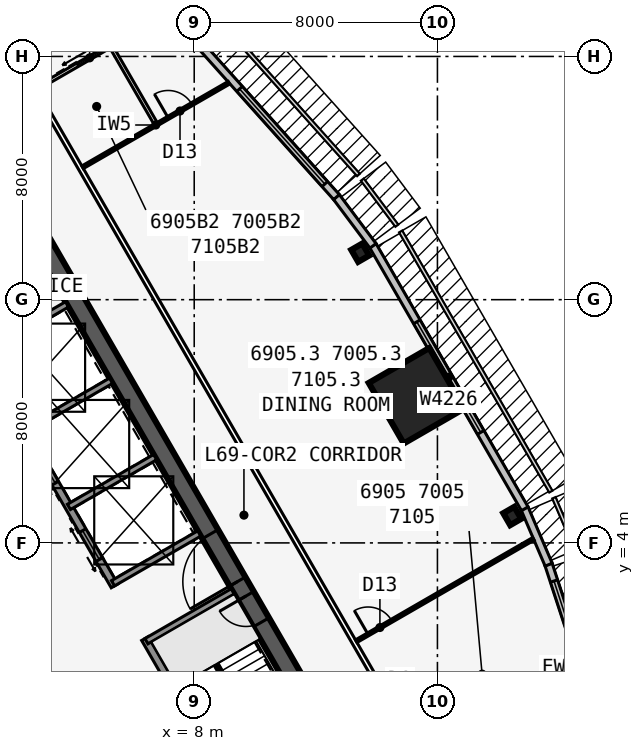
"""IFC4 building model, lengths in metres.
Left out: names, types, materials, properties, quantities, classifications, styles, units other than length and angle.
Written with IfcOpenShell. Run it as: python <this file> out.ifc"""

import sys

from ifc_helpers import new_model, si_unit, direction, frame, frame_2d, origin, origin_2d, place, context, subcontext, project, spatial, rectangle, i_section, extrude, element, fill, save


model = new_model("IFC4")
c1 = context("Model", 3, precision=1e-05, world=origin(), true_north=direction((0.0, 1.0)))
c2 = subcontext(c1, "Body", "Model", "MODEL_VIEW")
j1 = project(units=[si_unit("LENGTHUNIT", "METRE"), si_unit("PLANEANGLEUNIT", "RADIAN")], contexts=[c1])
p1 = place(None, origin())
s1 = spatial("IfcSite", under=j1, at=p1, CompositionType="ELEMENT")
p2 = place(p1, origin())
s2 = spatial("IfcBuilding", under=s1, at=p2, CompositionType="ELEMENT")
p3 = place(p2, frame((0.0, 0.0, 260.9)))
s3 = spatial("IfcBuildingStorey", under=s2, at=p3, CompositionType="ELEMENT", Elevation=260.9)
p4 = place(p3, frame((16.5, -9.526, 0.0), z_axis=(0.0, 0.0, 1.0), x_axis=(-0.499999749417, 0.866025548458, 0.0)))
e1 = element("IfcWall", 1, at=p4, inside=s3, PredefinedType="SHEAR", context=c2, shape_type="SweptSolid", body=[
    extrude(rectangle(XDim=33.0, YDim=0.6, at=frame_2d((16.5, 0.0))), origin(), (0.0, 0.0, 1.0), 3.6),
])
p5 = place(p4, frame((14.15, 0.0, 0.0)))
e2 = element("IfcOpeningElement", 2, at=p5, cuts=e1, PredefinedType="OPENING", context=c2, shape_type="SweptSolid", body=[
    extrude(rectangle(XDim=1.8, YDim=2.13, at=frame_2d((0.9, 1.065))), frame((0.0, 0.31, 0.0), z_axis=(0.0, -1.0, 0.0), x_axis=(1.0, 0.0, 0.0)), (0.0, 0.0, 1.0), 0.62),
])
p6 = place(p4, frame((12.6, 0.0, 0.0)))
e3 = element("IfcOpeningElement", 3, at=p6, cuts=e1, PredefinedType="OPENING", context=c2, shape_type="SweptSolid", body=[
    extrude(rectangle(XDim=1.0, YDim=2.13, at=frame_2d((0.5, 1.065))), frame((0.0, 0.31, 0.0), z_axis=(0.0, -1.0, 0.0), x_axis=(1.0, 0.0, 0.0)), (0.0, 0.0, 1.0), 0.62),
])
p7 = place(p3, frame((10.245, -5.843, 0.0), z_axis=(0.0, 0.0, 1.0), x_axis=(-0.499993009313, 0.866029439822, 0.0)))
e4 = element("IfcWall", 4, at=p7, inside=s3, PredefinedType="SOLIDWALL", context=c2, shape_type="SweptSolid", body=[
    extrude(rectangle(XDim=7.733, YDim=0.25, at=frame_2d((3.866, 0.0))), origin(), (0.0, 0.0, 1.0), 3.435),
])
p8 = place(p3, frame((5.379, 2.586, 0.0), z_axis=(0.0, 0.0, 1.0), x_axis=(-0.500001375892, 0.866024609411, 0.0)))
e5 = element("IfcWall", 5, at=p8, inside=s3, PredefinedType="SOLIDWALL", context=c2, shape_type="SweptSolid", body=[
    extrude(rectangle(XDim=10.633, YDim=0.25, at=frame_2d((5.316, 0.0))), origin(), (0.0, 0.0, 1.0), 3.435),
])
p9 = place(p8, frame((9.164, 0.0, 0.0)))
e6 = element("IfcOpeningElement", 6, at=p9, cuts=e5, PredefinedType="OPENING", context=c2, shape_type="SweptSolid", body=[
    extrude(rectangle(XDim=0.9, YDim=2.13, at=frame_2d((0.45, 1.065))), frame((0.0, 0.135, 0.0), z_axis=(0.0, -1.0, 0.0), x_axis=(1.0, 0.0, 0.0)), (0.0, 0.0, 1.0), 0.27),
])
p10 = place(p8, frame((1.0, 0.0, 0.0)))
e7 = element("IfcOpeningElement", 7, at=p10, cuts=e5, PredefinedType="OPENING", context=c2, shape_type="SweptSolid", body=[
    extrude(rectangle(XDim=1.1, YDim=2.13, at=frame_2d((0.55, 1.065))), frame((0.0, 0.135, 0.0), z_axis=(0.0, -1.0, 0.0), x_axis=(1.0, 0.0, 0.0)), (0.0, 0.0, 1.0), 0.27),
])
p11 = place(p8, frame((3.9, 0.0, 0.0)))
e8 = element("IfcOpeningElement", 8, at=p11, cuts=e5, PredefinedType="OPENING", context=c2, shape_type="SweptSolid", body=[
    extrude(rectangle(XDim=1.1, YDim=2.13, at=frame_2d((0.55, 1.065))), frame((0.0, 0.135, 0.0), z_axis=(0.0, -1.0, 0.0), x_axis=(1.0, 0.0, 0.0)), (0.0, 0.0, 1.0), 0.27),
])
p12 = place(p8, frame((6.8, 0.0, 0.0)))
e9 = element("IfcOpeningElement", 9, at=p12, cuts=e5, PredefinedType="OPENING", context=c2, shape_type="SweptSolid", body=[
    extrude(rectangle(XDim=1.1, YDim=2.13, at=frame_2d((0.55, 1.065))), frame((0.0, 0.135, 0.0), z_axis=(0.0, -1.0, 0.0), x_axis=(1.0, 0.0, 0.0)), (0.0, 0.0, 1.0), 0.27),
])
for number, where, z_axis, x_axis in (
    (10, (6.429, 0.767, 0.0), (0.0, 0.0, 1.0), (0.866, 0.5, 0.0)),
    (11, (5.329, 2.673, 0.0), (0.0, 0.0, 1.0), (0.866, 0.5, 0.0)),
    (12, (3.879, 5.184, 0.0), (0.0, 0.0, 1.0), (0.866, 0.5, 0.0)),
    (13, (2.429, 7.696, 0.0), (0.0, 0.0, 1.0), (0.866, 0.5, 0.0)),
    (14, (0.979, 10.207, 0.0), (0.0, 0.0, 1.0), (0.866, 0.5, 0.0)),
):
    element("IfcWall", number, at=place(p3, frame(where, z_axis=z_axis, x_axis=x_axis)), inside=s3, PredefinedType="SOLIDWALL", context=c2, shape_type="SweptSolid", body=[
        extrude(rectangle(XDim=3.275, YDim=0.2, at=frame_2d((1.637, 0.0))), origin(), (0.0, 0.0, 1.0), 3.435),
    ])
for number, where, z_axis, x_axis in (
    (15, (18.461, 4.885, 0.0), (0.0, 0.0, 1.0), (0.866, 0.5, 0.0)),
    (16, (13.461, 13.545, 0.0), (0.0, 0.0, 1.0), (0.866, 0.5, 0.0)),
):
    element("IfcColumn", number, at=place(p3, frame(where, z_axis=z_axis, x_axis=x_axis)), inside=s3, PredefinedType="COLUMN", context=c2, shape_type="SweptSolid", body=[
        extrude(i_section(OverallWidth=0.419, OverallDepth=0.455, WebThickness=0.042, FlangeThickness=0.068, at=origin_2d()), origin(), (0.0, 0.0, 1.0), 3.6),
    ])
p13 = place(p3, frame((15.312, 8.84, 0.0), z_axis=(0.0, 0.0, 1.0), x_axis=(0.866025403784, 0.5, 0.0)))
e17 = element("IfcColumn", 17, at=p13, inside=s3, PredefinedType="COLUMN", context=c2, shape_type="SweptSolid", body=[
    extrude(rectangle(XDim=2.3, YDim=2.3, at=origin_2d()), origin(), (0.0, 0.0, 1.0), 3.6),
])
p14 = place(p3, frame((21.881, -3.503, 0.0), z_axis=(0.0, 0.0, 1.0), x_axis=(-0.311328857048, 0.95030223759, 0.0)))
e18 = element("IfcWall", 18, at=p14, inside=s3, PredefinedType="STANDARD", context=c2, shape_type="SweptSolid", body=[
    extrude(rectangle(XDim=7.153, YDim=0.25, at=frame_2d((3.576, 0.0))), origin(), (0.0, 0.0, 1.0), 3.435),
])
p15 = place(p14, frame((2.376, 0.0, 0.45)))
e19 = element("IfcOpeningElement", 19, at=p15, cuts=e18, PredefinedType="OPENING", context=c2, shape_type="SweptSolid", body=[
    extrude(rectangle(XDim=4.2, YDim=2.6, at=frame_2d((2.1, 1.3))), frame((0.0, 0.135, 0.0), z_axis=(0.0, -1.0, 0.0), x_axis=(1.0, 0.0, 0.0)), (0.0, 0.0, 1.0), 0.27),
])
p16 = place(p3, frame((19.658, 3.284, 0.0), z_axis=(0.0, 0.0, 1.0), x_axis=(-0.393290226175, 0.91941437774, 0.0)))
e20 = element("IfcWall", 20, at=p16, inside=s3, PredefinedType="STANDARD", context=c2, shape_type="SweptSolid", body=[
    extrude(rectangle(XDim=2.014, YDim=0.25, at=frame_2d((1.007, 0.0))), origin(), (0.0, 0.0, 1.0), 3.435),
])
p17 = place(p3, frame((18.873, 5.123, 0.0), z_axis=(0.0, 0.0, 1.0), x_axis=(-0.499993662806, 0.866029062534, 0.0)))
e21 = element("IfcWall", 21, at=p17, inside=s3, PredefinedType="STANDARD", context=c2, shape_type="SweptSolid", body=[
    extrude(rectangle(XDim=10.0, YDim=0.25, at=frame_2d((5.0, 0.0))), origin(), (0.0, 0.0, 1.0), 3.435),
])
p18 = place(p17, frame((2.9, 0.0, 0.45)))
e22 = element("IfcOpeningElement", 22, at=p18, cuts=e21, PredefinedType="OPENING", context=c2, shape_type="SweptSolid", body=[
    extrude(rectangle(XDim=4.2, YDim=2.6, at=frame_2d((2.1, 1.3))), frame((0.0, 0.135, 0.0), z_axis=(0.0, -1.0, 0.0), x_axis=(1.0, 0.0, 0.0)), (0.0, 0.0, 1.0), 0.27),
])
p19 = place(p3, frame((13.881, 13.771, 0.0), z_axis=(0.0, 0.0, 1.0), x_axis=(-0.599650843534, 0.800261748335, 0.0)))
e23 = element("IfcWall", 23, at=p19, inside=s3, PredefinedType="STANDARD", context=c2, shape_type="SweptSolid", body=[
    extrude(rectangle(XDim=2.014, YDim=0.25, at=frame_2d((1.007, 0.0))), origin(), (0.0, 0.0, 1.0), 3.435),
])
p20 = place(p3, frame((12.68, 15.374, 0.0), z_axis=(0.0, 0.0, 1.0), x_axis=(-0.667303550892, 0.744785855778, 0.0)))
e24 = element("IfcWall", 24, at=p20, inside=s3, PredefinedType="STANDARD", context=c2, shape_type="SweptSolid", body=[
    extrude(rectangle(XDim=7.153, YDim=0.25, at=frame_2d((3.576, 0.0))), origin(), (0.0, 0.0, 1.0), 3.435),
])
p21 = place(p20, frame((0.577, 0.0, 0.45)))
e25 = element("IfcOpeningElement", 25, at=p21, cuts=e24, PredefinedType="OPENING", context=c2, shape_type="SweptSolid", body=[
    extrude(rectangle(XDim=4.2, YDim=2.6, at=frame_2d((2.1, 1.3))), frame((0.0, 0.135, 0.0), z_axis=(0.0, -1.0, 0.0), x_axis=(1.0, 0.0, 0.0)), (0.0, 0.0, 1.0), 0.27),
])
p22 = place(p3, frame((20.177, -11.245, 0.0), z_axis=(0.0, 0.0, 1.0), x_axis=(-0.499998875317, 0.866026053119, 0.0)))
e26 = element("IfcWall", 26, at=p22, inside=s3, PredefinedType="PARTITIONING", context=c2, shape_type="SweptSolid", body=[
    extrude(rectangle(XDim=39.654, YDim=0.15, at=frame_2d((19.827, 0.0))), origin(), (0.0, 0.0, 1.0), 3.435),
])
p23 = place(p22, frame((10.352, 0.0, 0.0)))
e27 = element("IfcOpeningElement", 27, at=p23, cuts=e26, PredefinedType="OPENING", context=c2, shape_type="SweptSolid", body=[
    extrude(rectangle(XDim=0.95, YDim=2.13, at=frame_2d((0.475, 1.065))), frame((0.0, 0.085, 0.0), z_axis=(0.0, -1.0, 0.0), x_axis=(1.0, 0.0, 0.0)), (0.0, 0.0, 1.0), 0.17),
])
p24 = place(p3, frame((13.329, 0.767, 0.0), z_axis=(0.0, 0.0, 1.0), x_axis=(0.866020720842, 0.500008111007, 0.0)))
e28 = element("IfcWall", 28, at=p24, inside=s3, PredefinedType="PARTITIONING", context=c2, shape_type="SweptSolid", body=[
    extrude(rectangle(XDim=6.732, YDim=0.1, at=frame_2d((3.366, 0.0))), origin(), (0.0, 0.0, 1.0), 3.435),
])
p25 = place(p24, frame((0.45, 0.0, 0.0)))
e29 = element("IfcOpeningElement", 29, at=p25, cuts=e28, PredefinedType="OPENING", context=c2, shape_type="SweptSolid", body=[
    extrude(rectangle(XDim=0.9, YDim=2.13, at=frame_2d((0.45, 1.065))), frame((0.0, 0.06, 0.0), z_axis=(0.0, -1.0, 0.0), x_axis=(1.0, 0.0, 0.0)), (0.0, 0.0, 1.0), 0.12),
])
p26 = place(p3, frame((4.329, 16.355, 0.0), z_axis=(0.0, 0.0, 1.0), x_axis=(0.866029066823, 0.499993655377, 0.0)))
e30 = element("IfcWall", 30, at=p26, inside=s3, PredefinedType="PARTITIONING", context=c2, shape_type="SweptSolid", body=[
    extrude(rectangle(XDim=5.559, YDim=0.1, at=frame_2d((2.779, 0.0))), origin(), (0.0, 0.0, 1.0), 2.823),
])
p27 = place(p26, frame((3.25, 0.0, 0.0)))
e31 = element("IfcOpeningElement", 31, at=p27, cuts=e30, PredefinedType="OPENING", context=c2, shape_type="SweptSolid", body=[
    extrude(rectangle(XDim=0.9, YDim=2.13, at=frame_2d((0.45, 1.065))), frame((0.0, 0.06, 0.0), z_axis=(0.0, -1.0, 0.0), x_axis=(1.0, 0.0, 0.0)), (0.0, 0.0, 1.0), 0.12),
])
p28 = place(p3, frame((6.753, 17.755, 0.0), z_axis=(0.0, 0.0, 1.0), x_axis=(-0.499990139034, 0.866031096941, 0.0)))
e32 = element("IfcWall", 32, at=p28, inside=s3, PredefinedType="PLUMBINGWALL", context=c2, shape_type="SweptSolid", body=[
    extrude(rectangle(XDim=3.0, YDim=0.12, at=frame_2d((1.5, 0.0))), origin(), (0.0, 0.0, 1.0), 3.435),
])
p29 = place(p3, frame((2.829, 18.954, 0.0), z_axis=(0.0, 0.0, 1.0), x_axis=(0.866035715982, 0.499982138324, 0.0)))
e33 = element("IfcWall", 33, at=p29, inside=s3, PredefinedType="PLUMBINGWALL", context=c2, shape_type="SweptSolid", body=[
    extrude(rectangle(XDim=2.74, YDim=0.12, at=frame_2d((1.37, 0.0))), origin(), (0.0, 0.0, 1.0), 3.435),
])
p30 = place(p29, frame((1.55, 0.0, 0.0)))
e34 = element("IfcOpeningElement", 34, at=p30, cuts=e33, PredefinedType="OPENING", context=c2, shape_type="SweptSolid", body=[
    extrude(rectangle(XDim=0.9, YDim=2.13, at=frame_2d((0.45, 1.065))), frame((0.0, 0.07, 0.0), z_axis=(0.0, -1.0, 0.0), x_axis=(1.0, 0.0, 0.0)), (0.0, 0.0, 1.0), 0.14),
])
p31 = place(p3, frame((10.135, -2.401, 0.0), z_axis=(0.0, 0.0, 1.0), x_axis=(-0.499992232847, 0.866029888106, 0.0)))
e35 = element("IfcWall", 35, at=p31, inside=s3, PredefinedType="SOLIDWALL", context=c2, shape_type="SweptSolid", body=[
    extrude(rectangle(XDim=2.794, YDim=0.1, at=frame_2d((1.397, 0.0))), origin(), (0.0, 0.0, 1.0), 3.6),
])
p32 = place(p15, origin())
e36 = element("IfcWindow", 36, at=p32, inside=s3, PartitioningType="SINGLE_PANEL", PredefinedType="WINDOW", context=c2, shape_type="SweptSolid", body=[
    extrude(rectangle(XDim=4.2, YDim=2.6, at=frame_2d((2.1, 1.3))), frame((0.0, 0.03, 0.0), z_axis=(0.0, -1.0, 0.0), x_axis=(1.0, 0.0, 0.0)), (0.0, 0.0, 1.0), 0.06),
])
fill(e19, e36)
p33 = place(p18, origin())
e37 = element("IfcWindow", 37, at=p33, inside=s3, PartitioningType="SINGLE_PANEL", PredefinedType="WINDOW", context=c2, shape_type="SweptSolid", body=[
    extrude(rectangle(XDim=4.2, YDim=2.6, at=frame_2d((2.1, 1.3))), frame((0.0, 0.03, 0.0), z_axis=(0.0, -1.0, 0.0), x_axis=(1.0, 0.0, 0.0)), (0.0, 0.0, 1.0), 0.06),
])
fill(e22, e37)
p34 = place(p21, origin())
e38 = element("IfcWindow", 38, at=p34, inside=s3, PartitioningType="SINGLE_PANEL", PredefinedType="WINDOW", context=c2, shape_type="SweptSolid", body=[
    extrude(rectangle(XDim=4.2, YDim=2.6, at=frame_2d((2.1, 1.3))), frame((0.0, 0.03, 0.0), z_axis=(0.0, -1.0, 0.0), x_axis=(1.0, 0.0, 0.0)), (0.0, 0.0, 1.0), 0.06),
])
fill(e25, e38)
p35 = place(p25, origin())
e39 = element("IfcDoor", 39, at=p35, inside=s3, OperationType="SINGLE_SWING_LEFT", PredefinedType="DOOR", context=c2, shape_type="SweptSolid", body=[
    extrude(rectangle(XDim=0.9, YDim=2.13, at=frame_2d((0.45, 1.065))), frame((0.0, 0.025, 0.0), z_axis=(0.0, -1.0, 0.0), x_axis=(1.0, 0.0, 0.0)), (0.0, 0.0, 1.0), 0.05),
])
fill(e29, e39)
p36 = place(p27, origin())
e40 = element("IfcDoor", 40, at=p36, inside=s3, OperationType="SINGLE_SWING_LEFT", PredefinedType="DOOR", context=c2, shape_type="SweptSolid", body=[
    extrude(rectangle(XDim=0.9, YDim=2.13, at=frame_2d((0.45, 1.065))), frame((0.0, 0.025, 0.0), z_axis=(0.0, -1.0, 0.0), x_axis=(1.0, 0.0, 0.0)), (0.0, 0.0, 1.0), 0.05),
])
fill(e31, e40)
p37 = place(p30, origin())
e41 = element("IfcDoor", 41, at=p37, inside=s3, OperationType="SLIDING_TO_LEFT", PredefinedType="DOOR", context=c2, shape_type="SweptSolid", body=[
    extrude(rectangle(XDim=0.9, YDim=2.13, at=frame_2d((0.45, 1.065))), frame((0.0, 0.025, 0.0), z_axis=(0.0, -1.0, 0.0), x_axis=(1.0, 0.0, 0.0)), (0.0, 0.0, 1.0), 0.05),
])
fill(e34, e41)
p38 = place(p5, origin())
e42 = element("IfcDoor", 42, at=p38, inside=s3, OperationType="DOUBLE_DOOR_SINGLE_SWING", PredefinedType="DOOR", context=c2, shape_type="SweptSolid", body=[
    extrude(rectangle(XDim=1.8, YDim=2.13, at=frame_2d((0.9, 1.065))), frame((0.0, 0.025, 0.0), z_axis=(0.0, -1.0, 0.0), x_axis=(1.0, 0.0, 0.0)), (0.0, 0.0, 1.0), 0.05),
])
fill(e2, e42)
p39 = place(p6, origin())
e43 = element("IfcDoor", 43, at=p39, inside=s3, OperationType="SINGLE_SWING_RIGHT", PredefinedType="DOOR", context=c2, shape_type="SweptSolid", body=[
    extrude(rectangle(XDim=1.0, YDim=2.13, at=frame_2d((0.5, 1.065))), frame((0.0, 0.025, 0.0), z_axis=(0.0, -1.0, 0.0), x_axis=(1.0, 0.0, 0.0)), (0.0, 0.0, 1.0), 0.05),
])
fill(e3, e43)
p40 = place(p10, origin())
e44 = element("IfcDoor", 44, at=p40, inside=s3, OperationType="DOUBLE_DOOR_SLIDING", PredefinedType="USERDEFINED", context=c2, shape_type="SweptSolid", body=[
    extrude(rectangle(XDim=1.1, YDim=2.13, at=frame_2d((0.55, 1.065))), frame((0.0, 0.025, 0.0), z_axis=(0.0, -1.0, 0.0), x_axis=(1.0, 0.0, 0.0)), (0.0, 0.0, 1.0), 0.05),
])
fill(e7, e44)
p41 = place(p11, origin())
e45 = element("IfcDoor", 45, at=p41, inside=s3, OperationType="DOUBLE_DOOR_SLIDING", PredefinedType="USERDEFINED", context=c2, shape_type="SweptSolid", body=[
    extrude(rectangle(XDim=1.1, YDim=2.13, at=frame_2d((0.55, 1.065))), frame((0.0, 0.025, 0.0), z_axis=(0.0, -1.0, 0.0), x_axis=(1.0, 0.0, 0.0)), (0.0, 0.0, 1.0), 0.05),
])
fill(e8, e45)
save(model, sys.argv[1])
